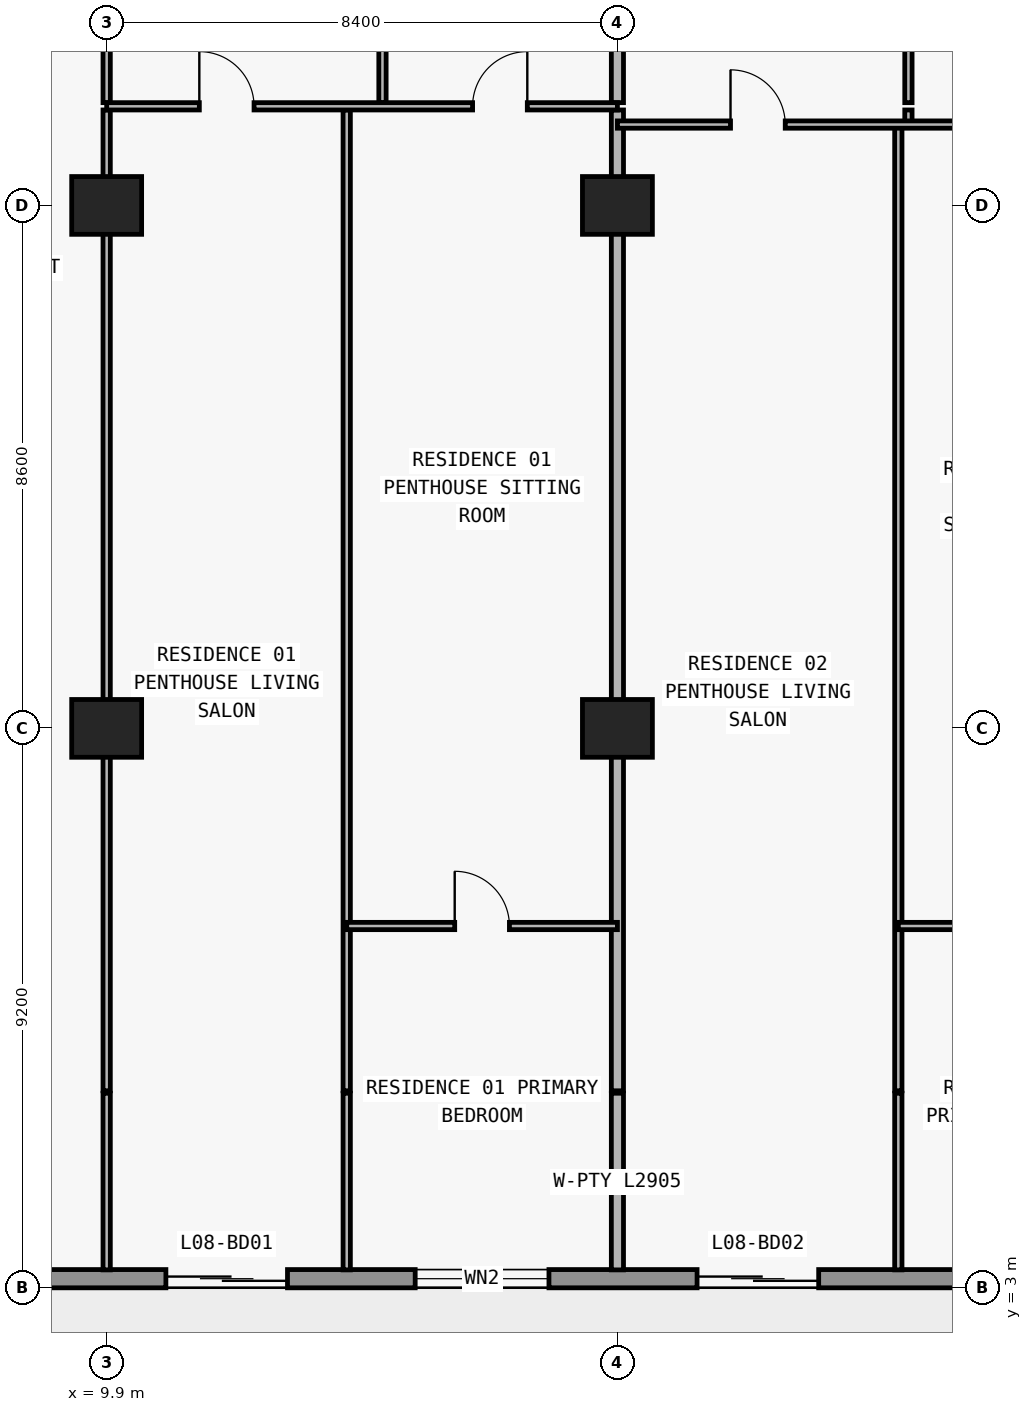
"""IFC4 building model, lengths in metres.
Left out: names, types, materials, properties, quantities, classifications, styles, units other than length and angle.
Written with IfcOpenShell. Run it as: python <this file> out.ifc"""

import sys

from ifc_helpers import new_model, si_unit, direction, frame, frame_2d, origin, origin_2d, place, context, subcontext, project, spatial, rectangle, extrude, element, fill, save


model = new_model("IFC4")
c1 = context("Model", 3, precision=1e-05, world=origin(), true_north=direction((0.0, 1.0)))
c2 = subcontext(c1, "Body", "Model", "MODEL_VIEW")
j1 = project(units=[si_unit("LENGTHUNIT", "METRE"), si_unit("PLANEANGLEUNIT", "RADIAN")], contexts=[c1])
p1 = place(None, origin())
s1 = spatial("IfcSite", under=j1, at=p1, CompositionType="ELEMENT")
p2 = place(p1, origin())
s2 = spatial("IfcBuilding", under=s1, at=p2, CompositionType="ELEMENT")
p3 = place(p2, frame((0.0, 0.0, 36.6)))
s3 = spatial("IfcBuildingStorey", under=s2, at=p3, CompositionType="ELEMENT", Elevation=36.6)
for number, where, z_axis, x_axis in (
    (1, (9.9, 12.2, 0.0), (0.0, 0.0, 1.0), (1.0, 0.0, 0.0)),
    (2, (18.3, 12.2, 0.0), (0.0, 0.0, 1.0), (1.0, 0.0, 0.0)),
    (3, (9.9, 20.8, 0.0), (0.0, 0.0, 1.0), (1.0, 0.0, 0.0)),
    (4, (18.3, 20.8, 0.0), (0.0, 0.0, 1.0), (1.0, 0.0, 0.0)),
):
    element("IfcColumn", number, at=place(p3, frame(where, z_axis=z_axis, x_axis=x_axis)), inside=s3, PredefinedType="COLUMN", context=c2, shape_type="SweptSolid", body=[
        extrude(rectangle(XDim=1.15, YDim=0.95, at=origin_2d()), origin(), (0.0, 0.0, 1.0), 3.05),
    ])
p4 = place(p3, frame((72.7, 3.15, 0.0), z_axis=(0.0, 0.0, 1.0), x_axis=(-1.0, 0.0, 0.0)))
e5 = element("IfcWall", 5, at=p4, inside=s3, PredefinedType="STANDARD", context=c2, shape_type="SweptSolid", body=[
    extrude(rectangle(XDim=67.6, YDim=0.3, at=frame_2d((33.8, 0.0))), origin(), (0.0, 0.0, 1.0), 3.05),
])
p5 = place(p4, frame((59.826, 0.0, 0.0)))
e6 = element("IfcOpeningElement", 6, at=p5, cuts=e5, PredefinedType="OPENING", context=c2, shape_type="SweptSolid", body=[
    extrude(rectangle(XDim=2.0, YDim=2.3, at=frame_2d((1.0, 1.15))), frame((0.0, 0.16, 0.0), z_axis=(0.0, -1.0, 0.0), x_axis=(1.0, 0.0, 0.0)), (0.0, 0.0, 1.0), 0.32),
])
p6 = place(p4, frame((55.526, 0.0, 0.85)))
e7 = element("IfcOpeningElement", 7, at=p6, cuts=e5, PredefinedType="OPENING", context=c2, shape_type="SweptSolid", body=[
    extrude(rectangle(XDim=2.2, YDim=1.55, at=frame_2d((1.1, 0.775))), frame((0.0, 0.16, 0.0), z_axis=(0.0, -1.0, 0.0), x_axis=(1.0, 0.0, 0.0)), (0.0, 0.0, 1.0), 0.32),
])
p7 = place(p4, frame((51.09, 0.0, 0.0)))
e8 = element("IfcOpeningElement", 8, at=p7, cuts=e5, PredefinedType="OPENING", context=c2, shape_type="SweptSolid", body=[
    extrude(rectangle(XDim=2.0, YDim=2.3, at=frame_2d((1.0, 1.15))), frame((0.0, 0.16, 0.0), z_axis=(0.0, -1.0, 0.0), x_axis=(1.0, 0.0, 0.0)), (0.0, 0.0, 1.0), 0.32),
])
p8 = place(p4, frame((46.99, 0.0, 0.85)))
e9 = element("IfcOpeningElement", 9, at=p8, cuts=e5, PredefinedType="OPENING", context=c2, shape_type="SweptSolid", body=[
    extrude(rectangle(XDim=1.8, YDim=1.55, at=frame_2d((0.9, 0.775))), frame((0.0, 0.16, 0.0), z_axis=(0.0, -1.0, 0.0), x_axis=(1.0, 0.0, 0.0)), (0.0, 0.0, 1.0), 0.32),
])
p9 = place(p4, frame((43.026, 0.0, 0.0)))
e10 = element("IfcOpeningElement", 10, at=p9, cuts=e5, PredefinedType="OPENING", context=c2, shape_type="SweptSolid", body=[
    extrude(rectangle(XDim=2.0, YDim=2.3, at=frame_2d((1.0, 1.15))), frame((0.0, 0.16, 0.0), z_axis=(0.0, -1.0, 0.0), x_axis=(1.0, 0.0, 0.0)), (0.0, 0.0, 1.0), 0.32),
])
p10 = place(p4, frame((38.726, 0.0, 0.85)))
e11 = element("IfcOpeningElement", 11, at=p10, cuts=e5, PredefinedType="OPENING", context=c2, shape_type="SweptSolid", body=[
    extrude(rectangle(XDim=2.2, YDim=1.55, at=frame_2d((1.1, 0.775))), frame((0.0, 0.16, 0.0), z_axis=(0.0, -1.0, 0.0), x_axis=(1.0, 0.0, 0.0)), (0.0, 0.0, 1.0), 0.32),
])
p11 = place(p4, frame((34.69, 0.0, 0.0)))
e12 = element("IfcOpeningElement", 12, at=p11, cuts=e5, PredefinedType="OPENING", context=c2, shape_type="SweptSolid", body=[
    extrude(rectangle(XDim=2.0, YDim=2.3, at=frame_2d((1.0, 1.15))), frame((0.0, 0.16, 0.0), z_axis=(0.0, -1.0, 0.0), x_axis=(1.0, 0.0, 0.0)), (0.0, 0.0, 1.0), 0.32),
])
p12 = place(p4, frame((30.81, 0.0, 0.65)))
e13 = element("IfcOpeningElement", 13, at=p12, cuts=e5, PredefinedType="OPENING", context=c2, shape_type="SweptSolid", body=[
    extrude(rectangle(XDim=2.6, YDim=1.85, at=frame_2d((1.3, 0.925))), frame((0.0, 0.16, 0.0), z_axis=(0.0, -1.0, 0.0), x_axis=(1.0, 0.0, 0.0)), (0.0, 0.0, 1.0), 0.32),
])
p13 = place(p4, frame((24.7, 0.0, 0.85)))
e14 = element("IfcOpeningElement", 14, at=p13, cuts=e5, PredefinedType="OPENING", context=c2, shape_type="SweptSolid", body=[
    extrude(rectangle(XDim=2.2, YDim=1.55, at=frame_2d((1.1, 0.775))), frame((0.0, 0.16, 0.0), z_axis=(0.0, -1.0, 0.0), x_axis=(1.0, 0.0, 0.0)), (0.0, 0.0, 1.0), 0.32),
])
p14 = place(p4, frame((18.626, 0.0, 0.0)))
e15 = element("IfcOpeningElement", 15, at=p14, cuts=e5, PredefinedType="OPENING", context=c2, shape_type="SweptSolid", body=[
    extrude(rectangle(XDim=2.0, YDim=2.3, at=frame_2d((1.0, 1.15))), frame((0.0, 0.16, 0.0), z_axis=(0.0, -1.0, 0.0), x_axis=(1.0, 0.0, 0.0)), (0.0, 0.0, 1.0), 0.32),
])
p15 = place(p4, frame((14.326, 0.0, 0.85)))
e16 = element("IfcOpeningElement", 16, at=p15, cuts=e5, PredefinedType="OPENING", context=c2, shape_type="SweptSolid", body=[
    extrude(rectangle(XDim=2.2, YDim=1.55, at=frame_2d((1.1, 0.775))), frame((0.0, 0.16, 0.0), z_axis=(0.0, -1.0, 0.0), x_axis=(1.0, 0.0, 0.0)), (0.0, 0.0, 1.0), 0.32),
])
p16 = place(p4, frame((9.89, 0.0, 0.0)))
e17 = element("IfcOpeningElement", 17, at=p16, cuts=e5, PredefinedType="OPENING", context=c2, shape_type="SweptSolid", body=[
    extrude(rectangle(XDim=2.0, YDim=2.3, at=frame_2d((1.0, 1.15))), frame((0.0, 0.16, 0.0), z_axis=(0.0, -1.0, 0.0), x_axis=(1.0, 0.0, 0.0)), (0.0, 0.0, 1.0), 0.32),
])
p17 = place(p4, frame((5.79, 0.0, 0.85)))
e18 = element("IfcOpeningElement", 18, at=p17, cuts=e5, PredefinedType="OPENING", context=c2, shape_type="SweptSolid", body=[
    extrude(rectangle(XDim=1.8, YDim=1.55, at=frame_2d((0.9, 0.775))), frame((0.0, 0.16, 0.0), z_axis=(0.0, -1.0, 0.0), x_axis=(1.0, 0.0, 0.0)), (0.0, 0.0, 1.0), 0.32),
])
p18 = place(p3, frame((9.9, 3.295, 0.0), z_axis=(0.0, 0.0, 1.0), x_axis=(0.0, 1.0, 0.0)))
e19 = element("IfcWall", 19, at=p18, inside=s3, PredefinedType="PARTITIONING", context=c2, shape_type="SweptSolid", body=[
    extrude(rectangle(XDim=2.905, YDim=0.12, at=frame_2d((1.453, 0.0))), origin(), (0.0, 0.0, 1.0), 3.05),
])
p19 = place(p3, frame((9.9, 6.24, 0.0), z_axis=(0.0, 0.0, 1.0), x_axis=(0.0, 1.0, 0.0)))
e20 = element("IfcWall", 20, at=p19, inside=s3, PredefinedType="PARTITIONING", context=c2, shape_type="SweptSolid", body=[
    extrude(rectangle(XDim=16.13, YDim=0.12, at=frame_2d((8.065, 0.0))), origin(), (0.0, 0.0, 1.0), 2.11),
])
p20 = place(p3, frame((9.9, 22.49, 0.0), z_axis=(0.0, 0.0, 1.0), x_axis=(0.0, 1.0, 0.0)))
e21 = element("IfcWall", 21, at=p20, inside=s3, PredefinedType="PARTITIONING", context=c2, shape_type="SweptSolid", body=[
    extrude(rectangle(XDim=4.69, YDim=0.12, at=frame_2d((2.345, 0.0))), origin(), (0.0, 0.0, 1.0), 2.11),
])
p21 = place(p20, frame((1.895, 0.0, 0.0)))
e22 = element("IfcOpeningElement", 22, at=p21, cuts=e21, PredefinedType="OPENING", context=c2, shape_type="SweptSolid", body=[
    extrude(rectangle(XDim=0.9, YDim=2.06, at=frame_2d((0.45, 1.03))), frame((0.0, 0.07, 0.0), z_axis=(0.0, -1.0, 0.0), x_axis=(1.0, 0.0, 0.0)), (0.0, 0.0, 1.0), 0.14),
])
p22 = place(p3, frame((13.848, 3.295, 0.0), z_axis=(0.0, 0.0, 1.0), x_axis=(0.0, 1.0, 0.0)))
e23 = element("IfcWall", 23, at=p22, inside=s3, PredefinedType="PARTITIONING", context=c2, shape_type="SweptSolid", body=[
    extrude(rectangle(XDim=2.905, YDim=0.12, at=frame_2d((1.453, 0.0))), origin(), (0.0, 0.0, 1.0), 3.05),
])
p23 = place(p3, frame((13.848, 6.24, 0.0), z_axis=(0.0, 0.0, 1.0), x_axis=(0.0, 1.0, 0.0)))
e24 = element("IfcWall", 24, at=p23, inside=s3, PredefinedType="PARTITIONING", context=c2, shape_type="SweptSolid", body=[
    extrude(rectangle(XDim=16.13, YDim=0.12, at=frame_2d((8.065, 0.0))), origin(), (0.0, 0.0, 1.0), 3.05),
])
p24 = place(p3, frame((14.436, 22.49, 0.0), z_axis=(0.0, 0.0, 1.0), x_axis=(0.0, 1.0, 0.0)))
e25 = element("IfcWall", 25, at=p24, inside=s3, PredefinedType="PARTITIONING", context=c2, shape_type="SweptSolid", body=[
    extrude(rectangle(XDim=4.69, YDim=0.12, at=frame_2d((2.345, 0.0))), origin(), (0.0, 0.0, 1.0), 3.05),
])
p25 = place(p24, frame((1.895, 0.0, 0.0)))
e26 = element("IfcOpeningElement", 26, at=p25, cuts=e25, PredefinedType="OPENING", context=c2, shape_type="SweptSolid", body=[
    extrude(rectangle(XDim=0.9, YDim=2.15, at=frame_2d((0.45, 1.075))), frame((0.0, 0.07, 0.0), z_axis=(0.0, -1.0, 0.0), x_axis=(1.0, 0.0, 0.0)), (0.0, 0.0, 1.0), 0.14),
])
p26 = place(p3, frame((18.3, 3.295, 0.0), z_axis=(0.0, 0.0, 1.0), x_axis=(0.0, 1.0, 0.0)))
e27 = element("IfcWall", 27, at=p26, inside=s3, PredefinedType="PARTITIONING", context=c2, shape_type="SweptSolid", body=[
    extrude(rectangle(XDim=2.905, YDim=0.2, at=frame_2d((1.453, 0.0))), origin(), (0.0, 0.0, 1.0), 3.05),
])
p27 = place(p3, frame((18.3, 6.24, 0.0), z_axis=(0.0, 0.0, 1.0), x_axis=(0.0, 1.0, 0.0)))
e28 = element("IfcWall", 28, at=p27, inside=s3, PredefinedType="PARTITIONING", context=c2, shape_type="SweptSolid", body=[
    extrude(rectangle(XDim=16.13, YDim=0.2, at=frame_2d((8.065, 0.0))), origin(), (0.0, 0.0, 1.0), 2.11),
])
p28 = place(p3, frame((18.3, 22.49, 0.0), z_axis=(0.0, 0.0, 1.0), x_axis=(0.0, 1.0, 0.0)))
e29 = element("IfcWall", 29, at=p28, inside=s3, PredefinedType="PARTITIONING", context=c2, shape_type="SweptSolid", body=[
    extrude(rectangle(XDim=4.69, YDim=0.2, at=frame_2d((2.345, 0.0))), origin(), (0.0, 0.0, 1.0), 2.11),
])
p29 = place(p3, frame((22.92, 3.295, 0.0), z_axis=(0.0, 0.0, 1.0), x_axis=(0.0, 1.0, 0.0)))
e30 = element("IfcWall", 30, at=p29, inside=s3, PredefinedType="PARTITIONING", context=c2, shape_type="SweptSolid", body=[
    extrude(rectangle(XDim=2.905, YDim=0.12, at=frame_2d((1.453, 0.0))), origin(), (0.0, 0.0, 1.0), 3.05),
])
p30 = place(p3, frame((22.92, 6.24, 0.0), z_axis=(0.0, 0.0, 1.0), x_axis=(0.0, 1.0, 0.0)))
e31 = element("IfcWall", 31, at=p30, inside=s3, PredefinedType="PARTITIONING", context=c2, shape_type="SweptSolid", body=[
    extrude(rectangle(XDim=15.89, YDim=0.12, at=frame_2d((7.945, 0.0))), origin(), (0.0, 0.0, 1.0), 3.05),
])
p31 = place(p3, frame((23.086, 22.135, 0.0), z_axis=(0.0, 0.0, 1.0), x_axis=(0.0, 1.0, 0.0)))
e32 = element("IfcWall", 32, at=p31, inside=s3, PredefinedType="PARTITIONING", context=c2, shape_type="SweptSolid", body=[
    extrude(rectangle(XDim=0.235, YDim=0.12, at=frame_2d((0.118, 0.0))), origin(), (0.0, 0.0, 1.0), 3.05),
])
p32 = place(p3, frame((23.086, 22.49, 0.0), z_axis=(0.0, 0.0, 1.0), x_axis=(0.0, 1.0, 0.0)))
e33 = element("IfcWall", 33, at=p32, inside=s3, PredefinedType="PARTITIONING", context=c2, shape_type="SweptSolid", body=[
    extrude(rectangle(XDim=4.69, YDim=0.12, at=frame_2d((2.345, 0.0))), origin(), (0.0, 0.0, 1.0), 3.05),
])
p33 = place(p32, frame((1.895, 0.0, 0.0)))
e34 = element("IfcOpeningElement", 34, at=p33, cuts=e33, PredefinedType="OPENING", context=c2, shape_type="SweptSolid", body=[
    extrude(rectangle(XDim=0.9, YDim=2.15, at=frame_2d((0.45, 1.075))), frame((0.0, 0.07, 0.0), z_axis=(0.0, -1.0, 0.0), x_axis=(1.0, 0.0, 0.0)), (0.0, 0.0, 1.0), 0.14),
])
p34 = place(p3, frame((13.848, 8.95, 0.0), z_axis=(0.0, 0.0, 1.0), x_axis=(1.0, 0.0, 0.0)))
e35 = element("IfcWall", 35, at=p34, inside=s3, PredefinedType="PARTITIONING", context=c2, shape_type="SweptSolid", body=[
    extrude(rectangle(XDim=4.452, YDim=0.12, at=frame_2d((2.226, 0.0))), origin(), (0.0, 0.0, 1.0), 3.05),
])
p35 = place(p34, frame((1.776, 0.0, 0.0)))
e36 = element("IfcOpeningElement", 36, at=p35, cuts=e35, PredefinedType="OPENING", context=c2, shape_type="SweptSolid", body=[
    extrude(rectangle(XDim=0.9, YDim=2.15, at=frame_2d((0.45, 1.075))), frame((0.0, 0.07, 0.0), z_axis=(0.0, -1.0, 0.0), x_axis=(1.0, 0.0, 0.0)), (0.0, 0.0, 1.0), 0.14),
])
p36 = place(p3, frame((22.92, 8.95, 0.0), z_axis=(0.0, 0.0, 1.0), x_axis=(1.0, 0.0, 0.0)))
e37 = element("IfcWall", 37, at=p36, inside=s3, PredefinedType="PARTITIONING", context=c2, shape_type="SweptSolid", body=[
    extrude(rectangle(XDim=3.78, YDim=0.12, at=frame_2d((1.89, 0.0))), origin(), (0.0, 0.0, 1.0), 3.05),
])
p37 = place(p36, frame((1.44, 0.0, 0.0)))
e38 = element("IfcOpeningElement", 38, at=p37, cuts=e37, PredefinedType="OPENING", context=c2, shape_type="SweptSolid", body=[
    extrude(rectangle(XDim=0.9, YDim=2.15, at=frame_2d((0.45, 1.075))), frame((0.0, 0.07, 0.0), z_axis=(0.0, -1.0, 0.0), x_axis=(1.0, 0.0, 0.0)), (0.0, 0.0, 1.0), 0.14),
])
p38 = place(p3, frame((18.3, 22.13, 0.0), z_axis=(0.0, 0.0, 1.0), x_axis=(1.0, 0.0, 0.0)))
e39 = element("IfcWall", 39, at=p38, inside=s3, PredefinedType="PARTITIONING", context=c2, shape_type="SweptSolid", body=[
    extrude(rectangle(XDim=8.13, YDim=0.12, at=frame_2d((4.065, 0.0))), origin(), (0.0, 0.0, 1.0), 3.05),
])
p39 = place(p38, frame((1.86, 0.0, 0.0)))
e40 = element("IfcOpeningElement", 40, at=p39, cuts=e39, PredefinedType="OPENING", context=c2, shape_type="SweptSolid", body=[
    extrude(rectangle(XDim=0.9, YDim=2.15, at=frame_2d((0.45, 1.075))), frame((0.0, 0.07, 0.0), z_axis=(0.0, -1.0, 0.0), x_axis=(1.0, 0.0, 0.0)), (0.0, 0.0, 1.0), 0.14),
])
p40 = place(p38, frame((6.008, 0.0, 0.0)))
e41 = element("IfcOpeningElement", 41, at=p40, cuts=e39, PredefinedType="OPENING", context=c2, shape_type="SweptSolid", body=[
    extrude(rectangle(XDim=0.9, YDim=2.15, at=frame_2d((0.45, 1.075))), frame((0.0, 0.07, 0.0), z_axis=(0.0, -1.0, 0.0), x_axis=(1.0, 0.0, 0.0)), (0.0, 0.0, 1.0), 0.14),
])
p41 = place(p3, frame((9.9, 22.43, 0.0), z_axis=(0.0, 0.0, 1.0), x_axis=(1.0, 0.0, 0.0)))
e42 = element("IfcWall", 42, at=p41, inside=s3, PredefinedType="PARTITIONING", context=c2, shape_type="SweptSolid", body=[
    extrude(rectangle(XDim=8.4, YDim=0.12, at=frame_2d((4.2, 0.0))), origin(), (0.0, 0.0, 1.0), 3.05),
])
p42 = place(p41, frame((1.524, 0.0, 0.0)))
e43 = element("IfcOpeningElement", 43, at=p42, cuts=e42, PredefinedType="OPENING", context=c2, shape_type="SweptSolid", body=[
    extrude(rectangle(XDim=0.9, YDim=2.15, at=frame_2d((0.45, 1.075))), frame((0.0, 0.07, 0.0), z_axis=(0.0, -1.0, 0.0), x_axis=(1.0, 0.0, 0.0)), (0.0, 0.0, 1.0), 0.14),
])
p43 = place(p41, frame((6.018, 0.0, 0.0)))
e44 = element("IfcOpeningElement", 44, at=p43, cuts=e42, PredefinedType="OPENING", context=c2, shape_type="SweptSolid", body=[
    extrude(rectangle(XDim=0.9, YDim=2.15, at=frame_2d((0.45, 1.075))), frame((0.0, 0.07, 0.0), z_axis=(0.0, -1.0, 0.0), x_axis=(1.0, 0.0, 0.0)), (0.0, 0.0, 1.0), 0.14),
])
p44 = place(p5, origin())
e45 = element("IfcDoor", 45, at=p44, inside=s3, OperationType="DOUBLE_DOOR_SLIDING", PredefinedType="DOOR", context=c2, shape_type="SweptSolid", body=[
    extrude(rectangle(XDim=2.0, YDim=2.3, at=frame_2d((1.0, 1.15))), frame((0.0, 0.025, 0.0), z_axis=(0.0, -1.0, 0.0), x_axis=(1.0, 0.0, 0.0)), (0.0, 0.0, 1.0), 0.05),
])
fill(e6, e45)
p45 = place(p6, origin())
e46 = element("IfcWindow", 46, at=p45, inside=s3, PartitioningType="SINGLE_PANEL", PredefinedType="WINDOW", context=c2, shape_type="SweptSolid", body=[
    extrude(rectangle(XDim=2.2, YDim=1.55, at=frame_2d((1.1, 0.775))), frame((0.0, 0.03, 0.0), z_axis=(0.0, -1.0, 0.0), x_axis=(1.0, 0.0, 0.0)), (0.0, 0.0, 1.0), 0.06),
])
fill(e7, e46)
p46 = place(p7, origin())
e47 = element("IfcDoor", 47, at=p46, inside=s3, OperationType="DOUBLE_DOOR_SLIDING", PredefinedType="DOOR", context=c2, shape_type="SweptSolid", body=[
    extrude(rectangle(XDim=2.0, YDim=2.3, at=frame_2d((1.0, 1.15))), frame((0.0, 0.025, 0.0), z_axis=(0.0, -1.0, 0.0), x_axis=(1.0, 0.0, 0.0)), (0.0, 0.0, 1.0), 0.05),
])
fill(e8, e47)
p47 = place(p42, origin())
e48 = element("IfcDoor", 48, at=p47, inside=s3, OperationType="SINGLE_SWING_LEFT", PredefinedType="DOOR", context=c2, shape_type="SweptSolid", body=[
    extrude(rectangle(XDim=0.9, YDim=2.15, at=frame_2d((0.45, 1.075))), frame((0.0, 0.025, 0.0), z_axis=(0.0, -1.0, 0.0), x_axis=(1.0, 0.0, 0.0)), (0.0, 0.0, 1.0), 0.05),
])
fill(e43, e48)
p48 = place(p43, origin())
e49 = element("IfcDoor", 49, at=p48, inside=s3, OperationType="SINGLE_SWING_RIGHT", PredefinedType="DOOR", context=c2, shape_type="SweptSolid", body=[
    extrude(rectangle(XDim=0.9, YDim=2.15, at=frame_2d((0.45, 1.075))), frame((0.0, 0.025, 0.0), z_axis=(0.0, -1.0, 0.0), x_axis=(1.0, 0.0, 0.0)), (0.0, 0.0, 1.0), 0.05),
])
fill(e44, e49)
p49 = place(p35, origin())
e50 = element("IfcDoor", 50, at=p49, inside=s3, OperationType="SINGLE_SWING_LEFT", PredefinedType="DOOR", context=c2, shape_type="SweptSolid", body=[
    extrude(rectangle(XDim=0.9, YDim=2.15, at=frame_2d((0.45, 1.075))), frame((0.0, 0.025, 0.0), z_axis=(0.0, -1.0, 0.0), x_axis=(1.0, 0.0, 0.0)), (0.0, 0.0, 1.0), 0.05),
])
fill(e36, e50)
p50 = place(p39, origin())
e51 = element("IfcDoor", 51, at=p50, inside=s3, OperationType="SINGLE_SWING_LEFT", PredefinedType="DOOR", context=c2, shape_type="SweptSolid", body=[
    extrude(rectangle(XDim=0.9, YDim=2.15, at=frame_2d((0.45, 1.075))), frame((0.0, 0.025, 0.0), z_axis=(0.0, -1.0, 0.0), x_axis=(1.0, 0.0, 0.0)), (0.0, 0.0, 1.0), 0.05),
])
fill(e40, e51)
save(model, sys.argv[1])
